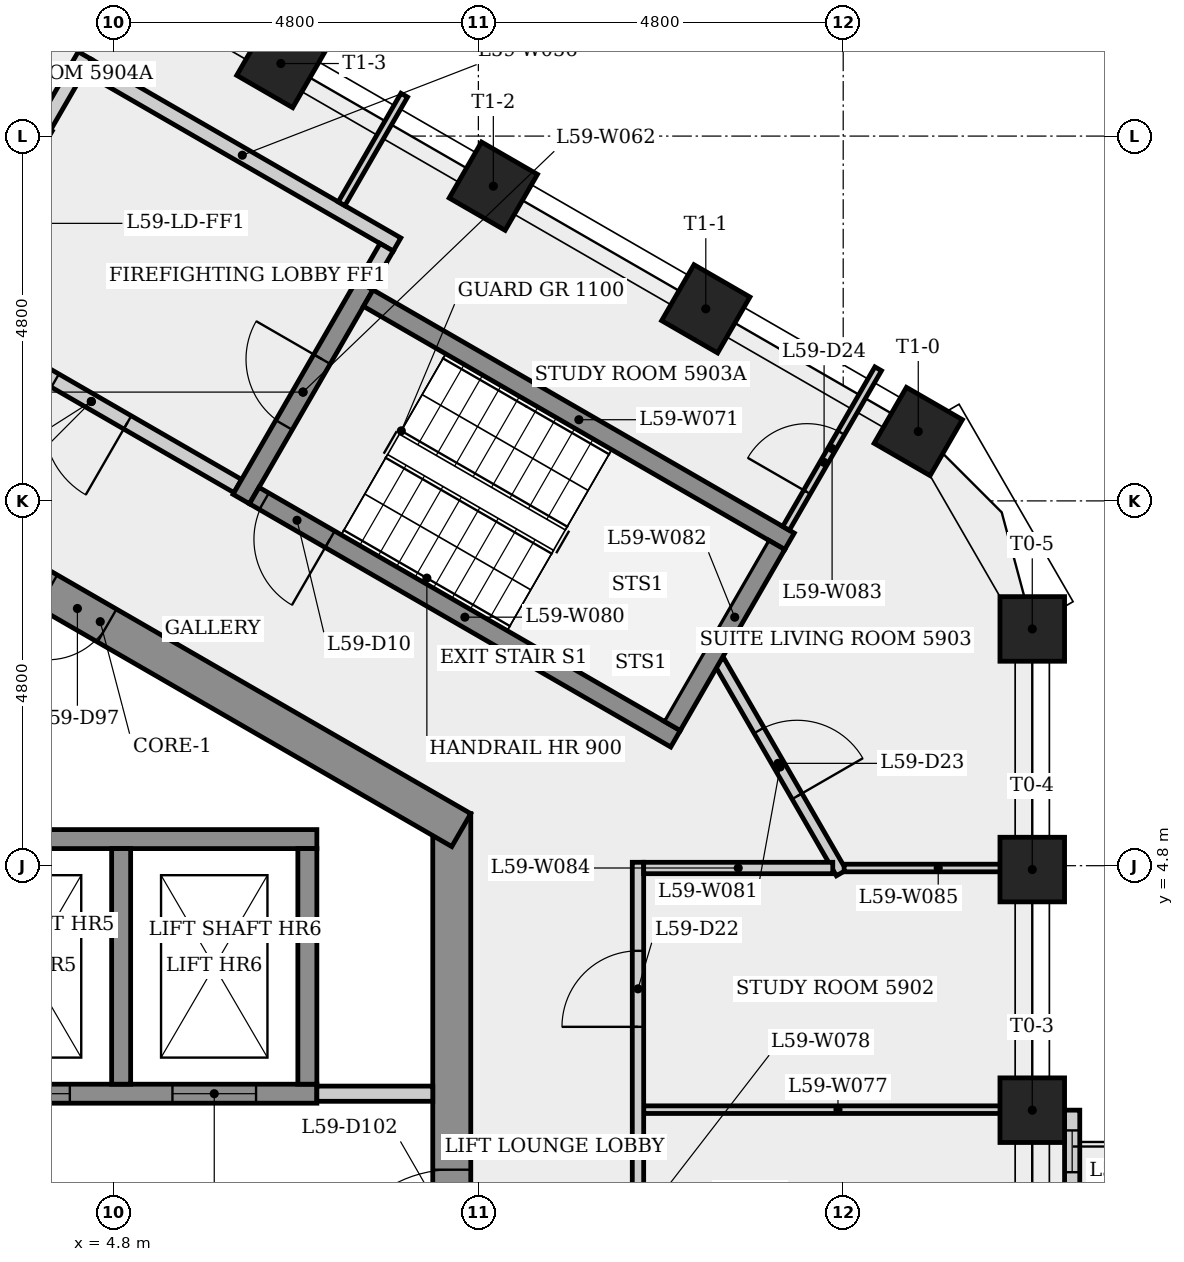
"""IFC4 building model, lengths in metres.
Left out: names, types, materials, properties, quantities, classifications, styles, units other than length and angle.
Written with IfcOpenShell. Run it as: python <this file> out.ifc"""

import sys

from ifc_helpers import new_model, si_unit, direction, frame, frame_2d, origin, origin_2d, place, context, subcontext, project, spatial, rectangle, extrude, element, fill, save


model = new_model("IFC4")
c1 = context("Model", 3, precision=1e-05, world=origin(), true_north=direction((0.0, 1.0)))
c2 = subcontext(c1, "Body", "Model", "MODEL_VIEW")
j1 = project(units=[si_unit("LENGTHUNIT", "METRE"), si_unit("PLANEANGLEUNIT", "RADIAN")], contexts=[c1])
p1 = place(None, origin())
s1 = spatial("IfcSite", under=j1, at=p1, CompositionType="ELEMENT")
p2 = place(p1, origin())
s2 = spatial("IfcBuilding", under=s1, at=p2, CompositionType="ELEMENT")
p3 = place(p2, frame((0.0, 0.0, 222.3)))
s3 = spatial("IfcBuildingStorey", under=s2, at=p3, CompositionType="ELEMENT", Elevation=222.3)
p4 = place(p3, frame((9.25, -5.485, 0.0), z_axis=(0.0, 0.0, 1.0), x_axis=(0.0, 1.0, 0.0)))
e1 = element("IfcWall", 1, at=p4, inside=s3, PredefinedType="SHEAR", context=c2, shape_type="SweptSolid", body=[
    extrude(rectangle(XDim=10.97, YDim=0.5, at=frame_2d((5.485, 0.0))), origin(), (0.0, 0.0, 1.0), 3.4),
])
p5 = place(p4, frame((4.685, 0.0, 0.0)))
e2 = element("IfcOpeningElement", 2, at=p5, cuts=e1, PredefinedType="OPENING", context=c2, shape_type="SweptSolid", body=[
    extrude(rectangle(XDim=1.6, YDim=2.1, at=frame_2d((0.8, 1.05))), frame((0.0, 0.26, 0.0), z_axis=(0.0, -1.0, 0.0), x_axis=(1.0, 0.0, 0.0)), (0.0, 0.0, 1.0), 0.52),
])
p6 = place(p3, frame((9.375, 5.268, 0.0), z_axis=(0.0, 0.0, 1.0), x_axis=(-0.866023993627, 0.500002442456, 0.0)))
e3 = element("IfcWall", 3, at=p6, inside=s3, PredefinedType="SHEAR", context=c2, shape_type="SweptSolid", body=[
    extrude(rectangle(XDim=10.97, YDim=0.5, at=frame_2d((5.485, 0.0))), origin(), (0.0, 0.0, 1.0), 3.4),
])
p7 = place(p6, frame((5.382, 0.0, 0.0)))
e4 = element("IfcOpeningElement", 4, at=p7, cuts=e3, PredefinedType="OPENING", context=c2, shape_type="SweptSolid", body=[
    extrude(rectangle(XDim=0.9, YDim=2.1, at=frame_2d((0.45, 1.05))), frame((0.0, 0.26, 0.0), z_axis=(0.0, -1.0, 0.0), x_axis=(1.0, 0.0, 0.0)), (0.0, 0.0, 1.0), 0.52),
])
for number, where, z_axis, x_axis in (
    (5, (16.887, 1.583, 0.0), (0.0, 0.0, 1.0), (1.0, 0.0, 0.0)),
    (6, (16.887, 4.749, 0.0), (0.0, 0.0, 1.0), (1.0, 0.0, 0.0)),
    (7, (16.887, 7.915, 0.0), (0.0, 0.0, 1.0), (1.0, 0.0, 0.0)),
    (8, (15.387, 10.513, 0.0), (0.0, 0.0, 1.0), (0.5, 0.866, 0.0)),
    (9, (12.592, 12.127, 0.0), (0.0, 0.0, 1.0), (0.5, 0.866, 0.0)),
    (10, (9.797, 13.741, 0.0), (0.0, 0.0, 1.0), (0.5, 0.866, 0.0)),
    (11, (7.001, 15.355, 0.0), (0.0, 0.0, 1.0), (0.5, 0.866, 0.0)),
):
    element("IfcColumn", number, at=place(p3, frame(where, z_axis=z_axis, x_axis=x_axis)), inside=s3, PredefinedType="COLUMN", context=c2, shape_type="SweptSolid", body=[
        extrude(rectangle(XDim=0.85, YDim=0.85, at=origin_2d()), origin(), (0.0, 0.0, 1.0), 3.4),
    ])
p8 = place(p3, frame((17.413, -1.583, 0.0), z_axis=(0.0, 0.0, 1.0), x_axis=(0.0, 1.0, 0.0)))
e12 = element("IfcWall", 12, at=p8, inside=s3, PredefinedType="SOLIDWALL", context=c2, shape_type="SweptSolid", body=[
    extrude(rectangle(XDim=3.166, YDim=0.2, at=frame_2d((1.583, 0.0))), origin(), (0.0, 0.0, 1.0), 3.4),
])
p9 = place(p8, frame((1.083, 0.0, 0.0)))
e13 = element("IfcOpeningElement", 13, at=p9, cuts=e12, PredefinedType="OPENING", context=c2, shape_type="SweptSolid", body=[
    extrude(rectangle(XDim=1.0, YDim=2.4, at=frame_2d((0.5, 1.2))), frame((0.0, 0.11, 0.0), z_axis=(0.0, -1.0, 0.0), x_axis=(1.0, 0.0, 0.0)), (0.0, 0.0, 1.0), 0.22),
])
p10 = place(p8, frame((0.267, 0.0, 0.9)))
e14 = element("IfcOpeningElement", 14, at=p10, cuts=e12, PredefinedType="OPENING", context=c2, shape_type="SweptSolid", body=[
    extrude(rectangle(XDim=0.55, YDim=1.5, at=frame_2d((0.275, 0.75))), frame((0.0, 0.11, 0.0), z_axis=(0.0, -1.0, 0.0), x_axis=(1.0, 0.0, 0.0)), (0.0, 0.0, 1.0), 0.22),
])
p11 = place(p8, frame((2.35, 0.0, 0.9)))
e15 = element("IfcOpeningElement", 15, at=p11, cuts=e12, PredefinedType="OPENING", context=c2, shape_type="SweptSolid", body=[
    extrude(rectangle(XDim=0.55, YDim=1.5, at=frame_2d((0.275, 0.75))), frame((0.0, 0.11, 0.0), z_axis=(0.0, -1.0, 0.0), x_axis=(1.0, 0.0, 0.0)), (0.0, 0.0, 1.0), 0.22),
])
p12 = place(p3, frame((-7.475, 1.8, 0.0), z_axis=(0.0, 0.0, 1.0), x_axis=(1.0, 0.0, 0.0)))
e16 = element("IfcWall", 16, at=p12, inside=s3, PredefinedType="SHEAR", context=c2, shape_type="SweptSolid", body=[
    extrude(rectangle(XDim=14.95, YDim=0.25, at=frame_2d((7.475, 0.0))), origin(), (0.0, 0.0, 1.0), 3.05),
])
p13 = place(p12, frame((0.8, 0.0, 0.0)))
e17 = element("IfcOpeningElement", 17, at=p13, cuts=e16, PredefinedType="OPENING", context=c2, shape_type="SweptSolid", body=[
    extrude(rectangle(XDim=1.1, YDim=2.1, at=frame_2d((0.55, 1.05))), frame((0.0, 0.135, 0.0), z_axis=(0.0, -1.0, 0.0), x_axis=(1.0, 0.0, 0.0)), (0.0, 0.0, 1.0), 0.27),
])
p14 = place(p12, frame((3.25, 0.0, 0.0)))
e18 = element("IfcOpeningElement", 18, at=p14, cuts=e16, PredefinedType="OPENING", context=c2, shape_type="SweptSolid", body=[
    extrude(rectangle(XDim=1.1, YDim=2.1, at=frame_2d((0.55, 1.05))), frame((0.0, 0.135, 0.0), z_axis=(0.0, -1.0, 0.0), x_axis=(1.0, 0.0, 0.0)), (0.0, 0.0, 1.0), 0.27),
])
p15 = place(p12, frame((5.7, 0.0, 0.0)))
e19 = element("IfcOpeningElement", 19, at=p15, cuts=e16, PredefinedType="OPENING", context=c2, shape_type="SweptSolid", body=[
    extrude(rectangle(XDim=1.1, YDim=2.1, at=frame_2d((0.55, 1.05))), frame((0.0, 0.135, 0.0), z_axis=(0.0, -1.0, 0.0), x_axis=(1.0, 0.0, 0.0)), (0.0, 0.0, 1.0), 0.27),
])
p16 = place(p12, frame((8.15, 0.0, 0.0)))
e20 = element("IfcOpeningElement", 20, at=p16, cuts=e16, PredefinedType="OPENING", context=c2, shape_type="SweptSolid", body=[
    extrude(rectangle(XDim=1.1, YDim=2.1, at=frame_2d((0.55, 1.05))), frame((0.0, 0.135, 0.0), z_axis=(0.0, -1.0, 0.0), x_axis=(1.0, 0.0, 0.0)), (0.0, 0.0, 1.0), 0.27),
])
p17 = place(p12, frame((10.6, 0.0, 0.0)))
e21 = element("IfcOpeningElement", 21, at=p17, cuts=e16, PredefinedType="OPENING", context=c2, shape_type="SweptSolid", body=[
    extrude(rectangle(XDim=1.1, YDim=2.1, at=frame_2d((0.55, 1.05))), frame((0.0, 0.135, 0.0), z_axis=(0.0, -1.0, 0.0), x_axis=(1.0, 0.0, 0.0)), (0.0, 0.0, 1.0), 0.27),
])
p18 = place(p12, frame((13.05, 0.0, 0.0)))
e22 = element("IfcOpeningElement", 22, at=p18, cuts=e16, PredefinedType="OPENING", context=c2, shape_type="SweptSolid", body=[
    extrude(rectangle(XDim=1.1, YDim=2.1, at=frame_2d((0.55, 1.05))), frame((0.0, 0.135, 0.0), z_axis=(0.0, -1.0, 0.0), x_axis=(1.0, 0.0, 0.0)), (0.0, 0.0, 1.0), 0.27),
])
p19 = place(p3, frame((-7.225, 5.15, 0.0), z_axis=(0.0, 0.0, 1.0), x_axis=(1.0, 0.0, 0.0)))
e23 = element("IfcWall", 23, at=p19, inside=s3, PredefinedType="SHEAR", context=c2, shape_type="SweptSolid", body=[
    extrude(rectangle(XDim=14.7, YDim=0.25, at=frame_2d((7.35, 0.0))), origin(), (0.0, 0.0, 1.0), 3.05),
])
p20 = place(p3, frame((3.885, 14.529, 0.0), z_axis=(0.0, 0.0, 1.0), x_axis=(0.499997628298, 0.866026773083, 0.0)))
e24 = element("IfcWall", 24, at=p20, inside=s3, PredefinedType="PARTITIONING", context=c2, shape_type="SweptSolid", body=[
    extrude(rectangle(XDim=1.075, YDim=0.2, at=frame_2d((0.538, 0.0))), origin(), (0.0, 0.0, 1.0), 3.05),
])
p21 = place(p3, frame((4.459, 15.323, 0.0), z_axis=(0.0, 0.0, 1.0), x_axis=(0.866016039709, -0.500016218704, 0.0)))
e25 = element("IfcWall", 25, at=p21, inside=s3, PredefinedType="PARTITIONING", context=c2, shape_type="SweptSolid", body=[
    extrude(rectangle(XDim=4.7, YDim=0.2, at=frame_2d((2.35, 0.0))), origin(), (0.0, 0.0, 1.0), 3.05),
])
p22 = place(p3, frame((4.9, 5.025, 0.0), z_axis=(0.0, 0.0, 1.0), x_axis=(0.0, -1.0, 0.0)))
e26 = element("IfcWall", 26, at=p22, inside=s3, PredefinedType="SHEAR", context=c2, shape_type="SweptSolid", body=[
    extrude(rectangle(XDim=3.1, YDim=0.25, at=frame_2d((1.55, 0.0))), origin(), (0.0, 0.0, 1.0), 3.4),
])
p23 = place(p3, frame((6.435, 9.795, 0.0), z_axis=(0.0, 0.0, 1.0), x_axis=(-0.866012907634, 0.500021643343, 0.0)))
e27 = element("IfcWall", 27, at=p23, inside=s3, PredefinedType="PARTITIONING", context=c2, shape_type="SweptSolid", body=[
    extrude(rectangle(XDim=4.45, YDim=0.2, at=frame_2d((2.225, 0.0))), origin(), (0.0, 0.0, 1.0), 3.05),
])
p24 = place(p23, frame((1.675, 0.0, 0.0)))
e28 = element("IfcOpeningElement", 28, at=p24, cuts=e27, PredefinedType="OPENING", context=c2, shape_type="SweptSolid", body=[
    extrude(rectangle(XDim=1.1, YDim=2.1, at=frame_2d((0.55, 1.05))), frame((0.0, 0.11, 0.0), z_axis=(0.0, -1.0, 0.0), x_axis=(1.0, 0.0, 0.0)), (0.0, 0.0, 1.0), 0.22),
])
p25 = place(p3, frame((6.48, 9.624, 0.0), z_axis=(0.0, 0.0, 1.0), x_axis=(0.500017246033, 0.866015446554, 0.0)))
e29 = element("IfcWall", 29, at=p25, inside=s3, PredefinedType="SHEAR", context=c2, shape_type="SweptSolid", body=[
    extrude(rectangle(XDim=3.25, YDim=0.25, at=frame_2d((1.625, 0.0))), origin(), (0.0, 0.0, 1.0), 3.05),
])
p26 = place(p25, frame((1.125, 0.0, 0.0)))
e30 = element("IfcOpeningElement", 30, at=p26, cuts=e29, PredefinedType="OPENING", context=c2, shape_type="SweptSolid", body=[
    extrude(rectangle(XDim=1.0, YDim=2.1, at=frame_2d((0.5, 1.05))), frame((0.0, 0.135, 0.0), z_axis=(0.0, -1.0, 0.0), x_axis=(1.0, 0.0, 0.0)), (0.0, 0.0, 1.0), 0.27),
])
p27 = place(p3, frame((7.475, 1.8, 0.0), z_axis=(0.0, 0.0, 1.0), x_axis=(1.0, 0.0, 0.0)))
e31 = element("IfcWall", 31, at=p27, inside=s3, PredefinedType="PARTITIONING", context=c2, shape_type="SweptSolid", body=[
    extrude(rectangle(XDim=1.525, YDim=0.2, at=frame_2d((0.763, 0.0))), origin(), (0.0, 0.0, 1.0), 3.05),
])
p28 = place(p3, frame((7.35, 5.025, 0.0), z_axis=(0.0, 0.0, 1.0), x_axis=(0.0, -1.0, 0.0)))
e32 = element("IfcWall", 32, at=p28, inside=s3, PredefinedType="SHEAR", context=c2, shape_type="SweptSolid", body=[
    extrude(rectangle(XDim=3.1, YDim=0.25, at=frame_2d((1.55, 0.0))), origin(), (0.0, 0.0, 1.0), 3.4),
])
p29 = place(p3, frame((7.8, 13.51, 0.0), z_axis=(0.0, 0.0, 1.0), x_axis=(0.499944585209, 0.866057395165, 0.0)))
e33 = element("IfcWall", 33, at=p29, inside=s3, PredefinedType="PARTITIONING", context=c2, shape_type="SweptSolid", body=[
    extrude(rectangle(XDim=1.649, YDim=0.1, at=frame_2d((0.825, 0.0))), origin(), (0.0, 0.0, 1.0), 3.05),
])
p30 = place(p3, frame((8.151, 12.268, 0.0), z_axis=(0.0, 0.0, 1.0), x_axis=(0.866025499775, -0.499999833739, 0.0)))
e34 = element("IfcWall", 34, at=p30, inside=s3, PredefinedType="SHEAR", context=c2, shape_type="SweptSolid", body=[
    extrude(rectangle(XDim=6.4, YDim=0.25, at=frame_2d((3.2, 0.0))), origin(), (0.0, 0.0, 1.0), 3.05),
])
p31 = place(p3, frame((8.393, 12.937, 0.0), z_axis=(0.0, 0.0, 1.0), x_axis=(-0.500065409566, -0.86598763626, 0.0)))
e35 = element("IfcWall", 35, at=p31, inside=s3, PredefinedType="PARTITIONING", context=c2, shape_type="SweptSolid", body=[
    extrude(rectangle(XDim=0.575, YDim=0.2, at=frame_2d((0.288, 0.0))), origin(), (0.0, 0.0, 1.0), 3.05),
])
p32 = place(p3, frame((11.775, 1.59, 0.0), z_axis=(0.0, 0.0, 1.0), x_axis=(1.0, 0.0, 0.0)))
e36 = element("IfcWall", 36, at=p32, inside=s3, PredefinedType="PARTITIONING", context=c2, shape_type="SweptSolid", body=[
    extrude(rectangle(XDim=5.113, YDim=0.1, at=frame_2d((2.556, 0.0))), origin(), (0.0, 0.0, 1.0), 3.05),
])
p33 = place(p3, frame((11.7, -4.695, 0.0), z_axis=(0.0, 0.0, 1.0), x_axis=(0.0, 1.0, 0.0)))
e37 = element("IfcWall", 37, at=p33, inside=s3, PredefinedType="PARTITIONING", context=c2, shape_type="SweptSolid", body=[
    extrude(rectangle(XDim=9.539, YDim=0.15, at=frame_2d((4.77, 0.0))), origin(), (0.0, 0.0, 1.0), 3.05),
])
p34 = place(p33, frame((2.627, 0.0, 0.0)))
e38 = element("IfcOpeningElement", 38, at=p34, cuts=e37, PredefinedType="OPENING", context=c2, shape_type="SweptSolid", body=[
    extrude(rectangle(XDim=1.0, YDim=2.1, at=frame_2d((0.5, 1.05))), frame((0.0, 0.085, 0.0), z_axis=(0.0, -1.0, 0.0), x_axis=(1.0, 0.0, 0.0)), (0.0, 0.0, 1.0), 0.17),
])
p35 = place(p33, frame((7.375, 0.0, 0.0)))
e39 = element("IfcOpeningElement", 39, at=p35, cuts=e37, PredefinedType="OPENING", context=c2, shape_type="SweptSolid", body=[
    extrude(rectangle(XDim=1.0, YDim=2.1, at=frame_2d((0.5, 1.05))), frame((0.0, 0.085, 0.0), z_axis=(0.0, -1.0, 0.0), x_axis=(1.0, 0.0, 0.0)), (0.0, 0.0, 1.0), 0.17),
])
p36 = place(p3, frame((12.194, 6.47, 0.0), z_axis=(0.0, 0.0, 1.0), x_axis=(-0.866025499775, 0.499999833739, 0.0)))
e40 = element("IfcWall", 40, at=p36, inside=s3, PredefinedType="SHEAR", context=c2, shape_type="SweptSolid", body=[
    extrude(rectangle(XDim=6.4, YDim=0.25, at=frame_2d((3.2, 0.0))), origin(), (0.0, 0.0, 1.0), 3.05),
])
p37 = place(p36, frame((5.25, 0.0, 0.0)))
e41 = element("IfcOpeningElement", 41, at=p37, cuts=e40, PredefinedType="OPENING", context=c2, shape_type="SweptSolid", body=[
    extrude(rectangle(XDim=1.0, YDim=2.1, at=frame_2d((0.5, 1.05))), frame((0.0, 0.135, 0.0), z_axis=(0.0, -1.0, 0.0), x_axis=(1.0, 0.0, 0.0)), (0.0, 0.0, 1.0), 0.27),
])
p38 = place(p3, frame((12.765, 7.493, 0.0), z_axis=(0.0, 0.0, 1.0), x_axis=(0.499995898912, -0.866027771536, 0.0)))
e42 = element("IfcWall", 42, at=p38, inside=s3, PredefinedType="PARTITIONING", context=c2, shape_type="SweptSolid", body=[
    extrude(rectangle(XDim=3.22, YDim=0.15, at=frame_2d((1.61, 0.0))), origin(), (0.0, 0.0, 1.0), 3.05),
])
p39 = place(p38, frame((1.055, 0.0, 0.0)))
e43 = element("IfcOpeningElement", 43, at=p39, cuts=e42, PredefinedType="OPENING", context=c2, shape_type="SweptSolid", body=[
    extrude(rectangle(XDim=1.0, YDim=2.1, at=frame_2d((0.5, 1.05))), frame((0.0, 0.085, 0.0), z_axis=(0.0, -1.0, 0.0), x_axis=(1.0, 0.0, 0.0)), (0.0, 0.0, 1.0), 0.17),
])
p40 = place(p3, frame((12.148, 6.641, 0.0), z_axis=(0.0, 0.0, 1.0), x_axis=(0.500034990121, 0.866005201286, 0.0)))
e44 = element("IfcWall", 44, at=p40, inside=s3, PredefinedType="SHEAR", context=c2, shape_type="SweptSolid", body=[
    extrude(rectangle(XDim=2.75, YDim=0.25, at=frame_2d((1.375, 0.0))), origin(), (0.0, 0.0, 1.0), 3.05),
])
p41 = place(p3, frame((13.648, 9.239, 0.0), z_axis=(0.0, 0.0, 1.0), x_axis=(0.500103096288, 0.865965872932, 0.0)))
e45 = element("IfcWall", 45, at=p41, inside=s3, PredefinedType="PARTITIONING", context=c2, shape_type="SweptSolid", body=[
    extrude(rectangle(XDim=2.424, YDim=0.1, at=frame_2d((1.212, 0.0))), origin(), (0.0, 0.0, 1.0), 3.05),
])
p42 = place(p41, frame((0.552, 0.0, 0.0)))
e46 = element("IfcOpeningElement", 46, at=p42, cuts=e45, PredefinedType="OPENING", context=c2, shape_type="SweptSolid", body=[
    extrude(rectangle(XDim=0.9, YDim=2.1, at=frame_2d((0.45, 1.05))), frame((0.0, 0.06, 0.0), z_axis=(0.0, -1.0, 0.0), x_axis=(1.0, 0.0, 0.0)), (0.0, 0.0, 1.0), 0.12),
])
p43 = place(p3, frame((14.263, 4.77, 0.0), z_axis=(0.0, 0.0, 1.0), x_axis=(-1.0, 0.0, 0.0)))
e47 = element("IfcWall", 47, at=p43, inside=s3, PredefinedType="PARTITIONING", context=c2, shape_type="SweptSolid", body=[
    extrude(rectangle(XDim=2.488, YDim=0.15, at=frame_2d((1.244, 0.0))), origin(), (0.0, 0.0, 1.0), 3.05),
])
p44 = place(p3, frame((14.413, 4.77, 0.0), z_axis=(0.0, 0.0, 1.0), x_axis=(1.0, 0.0, 0.0)))
e48 = element("IfcWall", 48, at=p44, inside=s3, PredefinedType="PARTITIONING", context=c2, shape_type="SweptSolid", body=[
    extrude(rectangle(XDim=2.475, YDim=0.1, at=frame_2d((1.237, 0.0))), origin(), (0.0, 0.0, 1.0), 3.05),
])
p45 = place(p11, origin())
e49 = element("IfcWindow", 49, at=p45, inside=s3, PartitioningType="SINGLE_PANEL", PredefinedType="WINDOW", context=c2, shape_type="SweptSolid", body=[
    extrude(rectangle(XDim=0.55, YDim=1.5, at=frame_2d((0.275, 0.75))), frame((0.0, 0.03, 0.0), z_axis=(0.0, -1.0, 0.0), x_axis=(1.0, 0.0, 0.0)), (0.0, 0.0, 1.0), 0.06),
])
fill(e15, e49)
p46 = place(p17, origin())
e50 = element("IfcDoor", 50, at=p46, inside=s3, OperationType="SLIDING_TO_LEFT", PredefinedType="DOOR", context=c2, shape_type="SweptSolid", body=[
    extrude(rectangle(XDim=1.1, YDim=2.1, at=frame_2d((0.55, 1.05))), frame((0.0, 0.025, 0.0), z_axis=(0.0, -1.0, 0.0), x_axis=(1.0, 0.0, 0.0)), (0.0, 0.0, 1.0), 0.05),
])
fill(e21, e50)
p47 = place(p18, origin())
e51 = element("IfcDoor", 51, at=p47, inside=s3, OperationType="SLIDING_TO_LEFT", PredefinedType="DOOR", context=c2, shape_type="SweptSolid", body=[
    extrude(rectangle(XDim=1.1, YDim=2.1, at=frame_2d((0.55, 1.05))), frame((0.0, 0.025, 0.0), z_axis=(0.0, -1.0, 0.0), x_axis=(1.0, 0.0, 0.0)), (0.0, 0.0, 1.0), 0.05),
])
fill(e22, e51)
p48 = place(p37, origin())
e52 = element("IfcDoor", 52, at=p48, inside=s3, OperationType="SINGLE_SWING_LEFT", PredefinedType="DOOR", context=c2, shape_type="SweptSolid", body=[
    extrude(rectangle(XDim=1.0, YDim=2.1, at=frame_2d((0.5, 1.05))), frame((0.0, 0.025, 0.0), z_axis=(0.0, -1.0, 0.0), x_axis=(1.0, 0.0, 0.0)), (0.0, 0.0, 1.0), 0.05),
])
fill(e41, e52)
p49 = place(p26, origin())
e53 = element("IfcDoor", 53, at=p49, inside=s3, OperationType="SINGLE_SWING_RIGHT", PredefinedType="DOOR", context=c2, shape_type="SweptSolid", body=[
    extrude(rectangle(XDim=1.0, YDim=2.1, at=frame_2d((0.5, 1.05))), frame((0.0, 0.025, 0.0), z_axis=(0.0, -1.0, 0.0), x_axis=(1.0, 0.0, 0.0)), (0.0, 0.0, 1.0), 0.05),
])
fill(e30, e53)
p50 = place(p24, origin())
e54 = element("IfcDoor", 54, at=p50, inside=s3, OperationType="SINGLE_SWING_LEFT", PredefinedType="DOOR", context=c2, shape_type="SweptSolid", body=[
    extrude(rectangle(XDim=1.1, YDim=2.1, at=frame_2d((0.55, 1.05))), frame((0.0, 0.025, 0.0), z_axis=(0.0, -1.0, 0.0), x_axis=(1.0, 0.0, 0.0)), (0.0, 0.0, 1.0), 0.05),
])
fill(e28, e54)
p51 = place(p35, origin())
e55 = element("IfcDoor", 55, at=p51, inside=s3, OperationType="SINGLE_SWING_LEFT", PredefinedType="DOOR", context=c2, shape_type="SweptSolid", body=[
    extrude(rectangle(XDim=1.0, YDim=2.1, at=frame_2d((0.5, 1.05))), frame((0.0, 0.025, 0.0), z_axis=(0.0, -1.0, 0.0), x_axis=(1.0, 0.0, 0.0)), (0.0, 0.0, 1.0), 0.05),
])
fill(e39, e55)
p52 = place(p39, origin())
e56 = element("IfcDoor", 56, at=p52, inside=s3, OperationType="SINGLE_SWING_RIGHT", PredefinedType="DOOR", context=c2, shape_type="SweptSolid", body=[
    extrude(rectangle(XDim=1.0, YDim=2.1, at=frame_2d((0.5, 1.05))), frame((0.0, 0.025, 0.0), z_axis=(0.0, -1.0, 0.0), x_axis=(1.0, 0.0, 0.0)), (0.0, 0.0, 1.0), 0.05),
])
fill(e43, e56)
p53 = place(p42, origin())
e57 = element("IfcDoor", 57, at=p53, inside=s3, OperationType="SINGLE_SWING_LEFT", PredefinedType="DOOR", context=c2, shape_type="SweptSolid", body=[
    extrude(rectangle(XDim=0.9, YDim=2.1, at=frame_2d((0.45, 1.05))), frame((0.0, 0.025, 0.0), z_axis=(0.0, -1.0, 0.0), x_axis=(1.0, 0.0, 0.0)), (0.0, 0.0, 1.0), 0.05),
])
fill(e46, e57)
p54 = place(p7, origin())
e58 = element("IfcDoor", 58, at=p54, inside=s3, OperationType="SINGLE_SWING_RIGHT", PredefinedType="DOOR", context=c2, shape_type="SweptSolid", body=[
    extrude(rectangle(XDim=0.9, YDim=2.1, at=frame_2d((0.45, 1.05))), frame((0.0, 0.025, 0.0), z_axis=(0.0, -1.0, 0.0), x_axis=(1.0, 0.0, 0.0)), (0.0, 0.0, 1.0), 0.05),
])
fill(e4, e58)
p55 = place(p5, origin())
e59 = element("IfcDoor", 59, at=p55, inside=s3, OperationType="SINGLE_SWING_LEFT", PredefinedType="DOOR", context=c2, shape_type="SweptSolid", body=[
    extrude(rectangle(XDim=1.6, YDim=2.1, at=frame_2d((0.8, 1.05))), frame((0.0, 0.025, 0.0), z_axis=(0.0, -1.0, 0.0), x_axis=(1.0, 0.0, 0.0)), (0.0, 0.0, 1.0), 0.05),
])
fill(e2, e59)
save(model, sys.argv[1])
